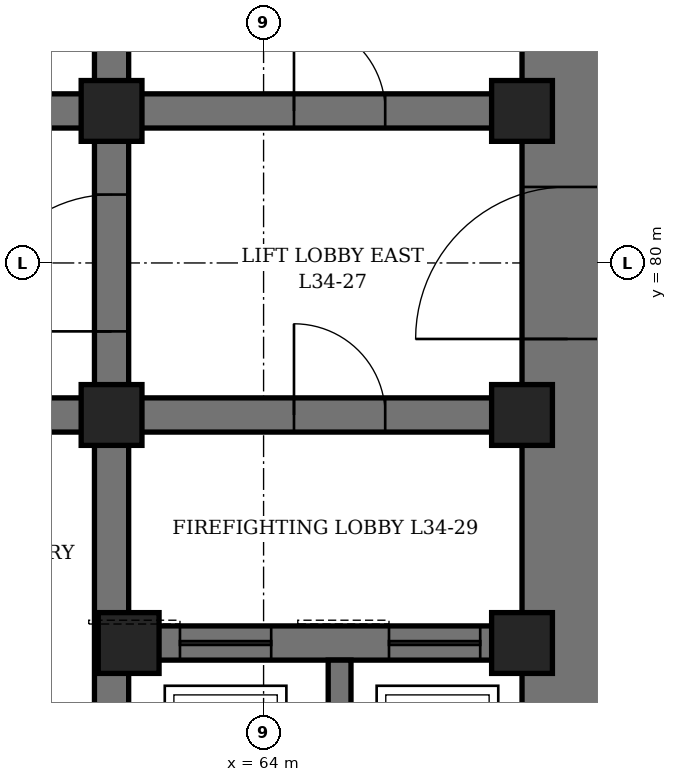
"""IFC4 building model, lengths in metres.
Left out: names, types, materials, properties, quantities, classifications, styles, units other than length and angle.
Written with IfcOpenShell. Run it as: python <this file> out.ifc"""

import sys

from ifc_helpers import new_model, si_unit, direction, frame, frame_2d, origin, origin_2d, place, context, subcontext, project, spatial, rectangle, hollow_rectangle, extrude, element, fill, save


model = new_model("IFC4")
c1 = context("Model", 3, precision=1e-05, world=origin(), true_north=direction((0.0, 1.0)))
c2 = subcontext(c1, "Body", "Model", "MODEL_VIEW")
j1 = project(units=[si_unit("LENGTHUNIT", "METRE"), si_unit("PLANEANGLEUNIT", "RADIAN")], contexts=[c1])
p1 = place(None, origin())
s1 = spatial("IfcSite", under=j1, at=p1, CompositionType="ELEMENT")
p2 = place(p1, origin())
s2 = spatial("IfcBuilding", under=s1, at=p2, CompositionType="ELEMENT")
p3 = place(p2, frame((0.0, 0.0, 154.3)))
s3 = spatial("IfcBuildingStorey", under=s2, at=p3, CompositionType="ELEMENT", Elevation=154.3)
p4 = place(p3, frame((68.0, 70.4, 0.0), z_axis=(0.0, 0.0, 1.0), x_axis=(0.0, 1.0, 0.0)))
e1 = element("IfcWall", 1, at=p4, inside=s3, PredefinedType="SHEAR", context=c2, shape_type="SweptSolid", body=[
    extrude(rectangle(XDim=19.2, YDim=1.2, at=frame_2d((9.6, 0.0))), origin(), (0.0, 0.0, 1.0), 4.2),
])
p5 = place(p4, frame((8.6, 0.0, 0.0)))
e2 = element("IfcOpeningElement", 2, at=p5, cuts=e1, PredefinedType="OPENING", context=c2, shape_type="SweptSolid", body=[
    extrude(rectangle(XDim=2.0, YDim=2.4, at=frame_2d((1.0, 1.2))), frame((0.0, 0.61, 0.0), z_axis=(0.0, -1.0, 0.0), x_axis=(1.0, 0.0, 0.0)), (0.0, 0.0, 1.0), 1.22),
])
p6 = place(p3, frame((62.0, 71.6, 0.0), z_axis=(0.0, 0.0, 1.0), x_axis=(0.0, 1.0, 0.0)))
e3 = element("IfcWall", 3, at=p6, inside=s3, PredefinedType="SHEAR", context=c2, shape_type="SweptSolid", body=[
    extrude(rectangle(XDim=16.8, YDim=0.45, at=frame_2d((8.4, 0.0))), origin(), (0.0, 0.0, 1.0), 4.2),
])
p7 = place(p6, frame((7.5, 0.0, 0.0)))
e4 = element("IfcOpeningElement", 4, at=p7, cuts=e3, PredefinedType="OPENING", context=c2, shape_type="SweptSolid", body=[
    extrude(rectangle(XDim=1.8, YDim=2.4, at=frame_2d((0.9, 1.2))), frame((0.0, 0.235, 0.0), z_axis=(0.0, -1.0, 0.0), x_axis=(1.0, 0.0, 0.0)), (0.0, 0.0, 1.0), 0.47),
])
p8 = place(p3, frame((62.225, 75.0, 0.0), z_axis=(0.0, 0.0, 1.0), x_axis=(1.0, 0.0, 0.0)))
e5 = element("IfcWall", 5, at=p8, inside=s3, PredefinedType="SHEAR", context=c2, shape_type="SweptSolid", body=[
    extrude(rectangle(XDim=5.175, YDim=0.45, at=frame_2d((2.587, 0.0))), origin(), (0.0, 0.0, 1.0), 4.2),
])
p9 = place(p8, frame((0.675, 0.0, 0.0)))
e6 = element("IfcOpeningElement", 6, at=p9, cuts=e5, PredefinedType="OPENING", context=c2, shape_type="SweptSolid", body=[
    extrude(rectangle(XDim=1.2, YDim=2.2, at=frame_2d((0.6, 1.1))), frame((0.0, 0.235, 0.0), z_axis=(0.0, -1.0, 0.0), x_axis=(1.0, 0.0, 0.0)), (0.0, 0.0, 1.0), 0.47),
])
p10 = place(p8, frame((3.425, 0.0, 0.0)))
e7 = element("IfcOpeningElement", 7, at=p10, cuts=e5, PredefinedType="OPENING", context=c2, shape_type="SweptSolid", body=[
    extrude(rectangle(XDim=1.2, YDim=2.2, at=frame_2d((0.6, 1.1))), frame((0.0, 0.235, 0.0), z_axis=(0.0, -1.0, 0.0), x_axis=(1.0, 0.0, 0.0)), (0.0, 0.0, 1.0), 0.47),
])
p11 = place(p3, frame((62.225, 78.0, 0.0), z_axis=(0.0, 0.0, 1.0), x_axis=(1.0, 0.0, 0.0)))
e8 = element("IfcWall", 8, at=p11, inside=s3, PredefinedType="SHEAR", context=c2, shape_type="SweptSolid", body=[
    extrude(rectangle(XDim=5.175, YDim=0.45, at=frame_2d((2.587, 0.0))), origin(), (0.0, 0.0, 1.0), 4.2),
])
p12 = place(p11, frame((2.175, 0.0, 0.0)))
e9 = element("IfcOpeningElement", 9, at=p12, cuts=e8, PredefinedType="OPENING", context=c2, shape_type="SweptSolid", body=[
    extrude(rectangle(XDim=1.2, YDim=2.1, at=frame_2d((0.6, 1.05))), frame((0.0, 0.235, 0.0), z_axis=(0.0, -1.0, 0.0), x_axis=(1.0, 0.0, 0.0)), (0.0, 0.0, 1.0), 0.47),
])
p13 = place(p3, frame((62.225, 82.0, 0.0), z_axis=(0.0, 0.0, 1.0), x_axis=(1.0, 0.0, 0.0)))
e10 = element("IfcWall", 10, at=p13, inside=s3, PredefinedType="SHEAR", context=c2, shape_type="SweptSolid", body=[
    extrude(rectangle(XDim=5.175, YDim=0.45, at=frame_2d((2.587, 0.0))), origin(), (0.0, 0.0, 1.0), 4.2),
])
p14 = place(p13, frame((2.175, 0.0, 0.0)))
e11 = element("IfcOpeningElement", 11, at=p14, cuts=e10, PredefinedType="OPENING", context=c2, shape_type="SweptSolid", body=[
    extrude(rectangle(XDim=1.2, YDim=2.1, at=frame_2d((0.6, 1.05))), frame((0.0, 0.235, 0.0), z_axis=(0.0, -1.0, 0.0), x_axis=(1.0, 0.0, 0.0)), (0.0, 0.0, 1.0), 0.47),
])
p15 = place(p3, frame((50.225, 78.0, 0.0), z_axis=(0.0, 0.0, 1.0), x_axis=(1.0, 0.0, 0.0)))
e12 = element("IfcWall", 12, at=p15, inside=s3, PredefinedType="SHEAR", context=c2, shape_type="SweptSolid", body=[
    extrude(rectangle(XDim=11.55, YDim=0.45, at=frame_2d((5.775, 0.0))), origin(), (0.0, 0.0, 1.0), 4.2),
])
p16 = place(p15, frame((0.825, 0.0, 0.0)))
e13 = element("IfcOpeningElement", 13, at=p16, cuts=e12, PredefinedType="OPENING", context=c2, shape_type="SweptSolid", body=[
    extrude(rectangle(XDim=0.9, YDim=2.1, at=frame_2d((0.45, 1.05))), frame((0.0, 0.235, 0.0), z_axis=(0.0, -1.0, 0.0), x_axis=(1.0, 0.0, 0.0)), (0.0, 0.0, 1.0), 0.47),
])
p17 = place(p15, frame((3.825, 0.0, 0.0)))
e14 = element("IfcOpeningElement", 14, at=p17, cuts=e12, PredefinedType="OPENING", context=c2, shape_type="SweptSolid", body=[
    extrude(rectangle(XDim=0.9, YDim=2.1, at=frame_2d((0.45, 1.05))), frame((0.0, 0.235, 0.0), z_axis=(0.0, -1.0, 0.0), x_axis=(1.0, 0.0, 0.0)), (0.0, 0.0, 1.0), 0.47),
])
p18 = place(p15, frame((6.825, 0.0, 0.0)))
e15 = element("IfcOpeningElement", 15, at=p18, cuts=e12, PredefinedType="OPENING", context=c2, shape_type="SweptSolid", body=[
    extrude(rectangle(XDim=0.9, YDim=2.1, at=frame_2d((0.45, 1.05))), frame((0.0, 0.235, 0.0), z_axis=(0.0, -1.0, 0.0), x_axis=(1.0, 0.0, 0.0)), (0.0, 0.0, 1.0), 0.47),
])
p19 = place(p15, frame((9.825, 0.0, 0.0)))
e16 = element("IfcOpeningElement", 16, at=p19, cuts=e12, PredefinedType="OPENING", context=c2, shape_type="SweptSolid", body=[
    extrude(rectangle(XDim=0.9, YDim=2.1, at=frame_2d((0.45, 1.05))), frame((0.0, 0.235, 0.0), z_axis=(0.0, -1.0, 0.0), x_axis=(1.0, 0.0, 0.0)), (0.0, 0.0, 1.0), 0.47),
])
p20 = place(p3, frame((50.225, 82.0, 0.0), z_axis=(0.0, 0.0, 1.0), x_axis=(1.0, 0.0, 0.0)))
e17 = element("IfcWall", 17, at=p20, inside=s3, PredefinedType="SHEAR", context=c2, shape_type="SweptSolid", body=[
    extrude(rectangle(XDim=11.55, YDim=0.45, at=frame_2d((5.775, 0.0))), origin(), (0.0, 0.0, 1.0), 4.2),
])
p21 = place(p20, frame((0.725, 0.0, 0.0)))
e18 = element("IfcOpeningElement", 18, at=p21, cuts=e17, PredefinedType="OPENING", context=c2, shape_type="SweptSolid", body=[
    extrude(rectangle(XDim=1.1, YDim=2.2, at=frame_2d((0.55, 1.1))), frame((0.0, 0.235, 0.0), z_axis=(0.0, -1.0, 0.0), x_axis=(1.0, 0.0, 0.0)), (0.0, 0.0, 1.0), 0.47),
])
p22 = place(p20, frame((3.725, 0.0, 0.0)))
e19 = element("IfcOpeningElement", 19, at=p22, cuts=e17, PredefinedType="OPENING", context=c2, shape_type="SweptSolid", body=[
    extrude(rectangle(XDim=1.1, YDim=2.2, at=frame_2d((0.55, 1.1))), frame((0.0, 0.235, 0.0), z_axis=(0.0, -1.0, 0.0), x_axis=(1.0, 0.0, 0.0)), (0.0, 0.0, 1.0), 0.47),
])
p23 = place(p20, frame((6.725, 0.0, 0.0)))
e20 = element("IfcOpeningElement", 20, at=p23, cuts=e17, PredefinedType="OPENING", context=c2, shape_type="SweptSolid", body=[
    extrude(rectangle(XDim=1.1, YDim=2.2, at=frame_2d((0.55, 1.1))), frame((0.0, 0.235, 0.0), z_axis=(0.0, -1.0, 0.0), x_axis=(1.0, 0.0, 0.0)), (0.0, 0.0, 1.0), 0.47),
])
p24 = place(p20, frame((9.725, 0.0, 0.0)))
e21 = element("IfcOpeningElement", 21, at=p24, cuts=e17, PredefinedType="OPENING", context=c2, shape_type="SweptSolid", body=[
    extrude(rectangle(XDim=1.1, YDim=2.2, at=frame_2d((0.55, 1.1))), frame((0.0, 0.235, 0.0), z_axis=(0.0, -1.0, 0.0), x_axis=(1.0, 0.0, 0.0)), (0.0, 0.0, 1.0), 0.47),
])
p25 = place(p3, frame((65.0, 71.6, 0.0), z_axis=(0.0, 0.0, 1.0), x_axis=(0.0, 1.0, 0.0)))
e22 = element("IfcWall", 22, at=p25, inside=s3, PredefinedType="SHEAR", context=c2, shape_type="SweptSolid", body=[
    extrude(rectangle(XDim=3.175, YDim=0.3, at=frame_2d((1.587, 0.0))), origin(), (0.0, 0.0, 1.0), 4.2),
])
for number, where, z_axis, x_axis in (
    (23, (62.0, 78.0, 0.0), (0.0, 0.0, 1.0), (1.0, 0.0, 0.0)),
    (24, (62.0, 82.0, 0.0), (0.0, 0.0, 1.0), (1.0, 0.0, 0.0)),
    (25, (62.225, 75.0, 0.0), (0.0, 0.0, 1.0), (1.0, 0.0, 0.0)),
    (26, (67.4, 75.0, 0.0), (0.0, 0.0, 1.0), (1.0, 0.0, 0.0)),
    (27, (67.4, 78.0, 0.0), (0.0, 0.0, 1.0), (1.0, 0.0, 0.0)),
    (28, (67.4, 82.0, 0.0), (0.0, 0.0, 1.0), (1.0, 0.0, 0.0)),
):
    element("IfcColumn", number, at=place(p3, frame(where, z_axis=z_axis, x_axis=x_axis)), inside=s3, PredefinedType="COLUMN", context=c2, shape_type="SweptSolid", body=[
        extrude(hollow_rectangle(XDim=0.8, YDim=0.8, WallThickness=0.1, at=origin_2d()), origin(), (0.0, 0.0, 1.0), 4.2),
    ])
p26 = place(p14, origin())
e29 = element("IfcDoor", 29, at=p26, inside=s3, OperationType="SINGLE_SWING_LEFT", PredefinedType="DOOR", context=c2, shape_type="SweptSolid", body=[
    extrude(rectangle(XDim=1.2, YDim=2.1, at=frame_2d((0.6, 1.05))), frame((0.0, 0.225, 0.0), z_axis=(0.0, -1.0, 0.0), x_axis=(1.0, 0.0, 0.0)), (0.0, 0.0, 1.0), 0.449),
])
fill(e11, e29)
p27 = place(p5, origin())
e30 = element("IfcDoor", 30, at=p27, inside=s3, OperationType="DOUBLE_DOOR_SINGLE_SWING", PredefinedType="DOOR", context=c2, shape_type="SweptSolid", body=[
    extrude(rectangle(XDim=2.0, YDim=2.4, at=frame_2d((1.0, 1.2))), frame((0.0, 0.35, 0.0), z_axis=(0.0, -1.0, 0.0), x_axis=(1.0, 0.0, 0.0)), (0.0, 0.0, 1.0), 0.7),
])
fill(e2, e30)
p28 = place(p7, origin())
e31 = element("IfcDoor", 31, at=p28, inside=s3, OperationType="DOUBLE_DOOR_SINGLE_SWING", PredefinedType="DOOR", context=c2, shape_type="SweptSolid", body=[
    extrude(rectangle(XDim=1.8, YDim=2.4, at=frame_2d((0.9, 1.2))), frame((0.0, 0.225, 0.0), z_axis=(0.0, -1.0, 0.0), x_axis=(1.0, 0.0, 0.0)), (0.0, 0.0, 1.0), 0.449),
])
fill(e4, e31)
p29 = place(p12, origin())
e32 = element("IfcDoor", 32, at=p29, inside=s3, OperationType="SINGLE_SWING_RIGHT", PredefinedType="DOOR", context=c2, shape_type="SweptSolid", body=[
    extrude(rectangle(XDim=1.2, YDim=2.1, at=frame_2d((0.6, 1.05))), frame((0.0, 0.225, 0.0), z_axis=(0.0, -1.0, 0.0), x_axis=(1.0, 0.0, 0.0)), (0.0, 0.0, 1.0), 0.449),
])
fill(e9, e32)
p30 = place(p9, origin())
e33 = element("IfcDoor", 33, at=p30, inside=s3, OperationType="SLIDING_TO_LEFT", PredefinedType="DOOR", context=c2, shape_type="SweptSolid", body=[
    extrude(rectangle(XDim=1.2, YDim=2.2, at=frame_2d((0.6, 1.1))), frame((0.0, 0.225, 0.0), z_axis=(0.0, -1.0, 0.0), x_axis=(1.0, 0.0, 0.0)), (0.0, 0.0, 1.0), 0.449),
])
fill(e6, e33)
p31 = place(p10, origin())
e34 = element("IfcDoor", 34, at=p31, inside=s3, OperationType="SLIDING_TO_LEFT", PredefinedType="DOOR", context=c2, shape_type="SweptSolid", body=[
    extrude(rectangle(XDim=1.2, YDim=2.2, at=frame_2d((0.6, 1.1))), frame((0.0, 0.225, 0.0), z_axis=(0.0, -1.0, 0.0), x_axis=(1.0, 0.0, 0.0)), (0.0, 0.0, 1.0), 0.449),
])
fill(e7, e34)
save(model, sys.argv[1])
